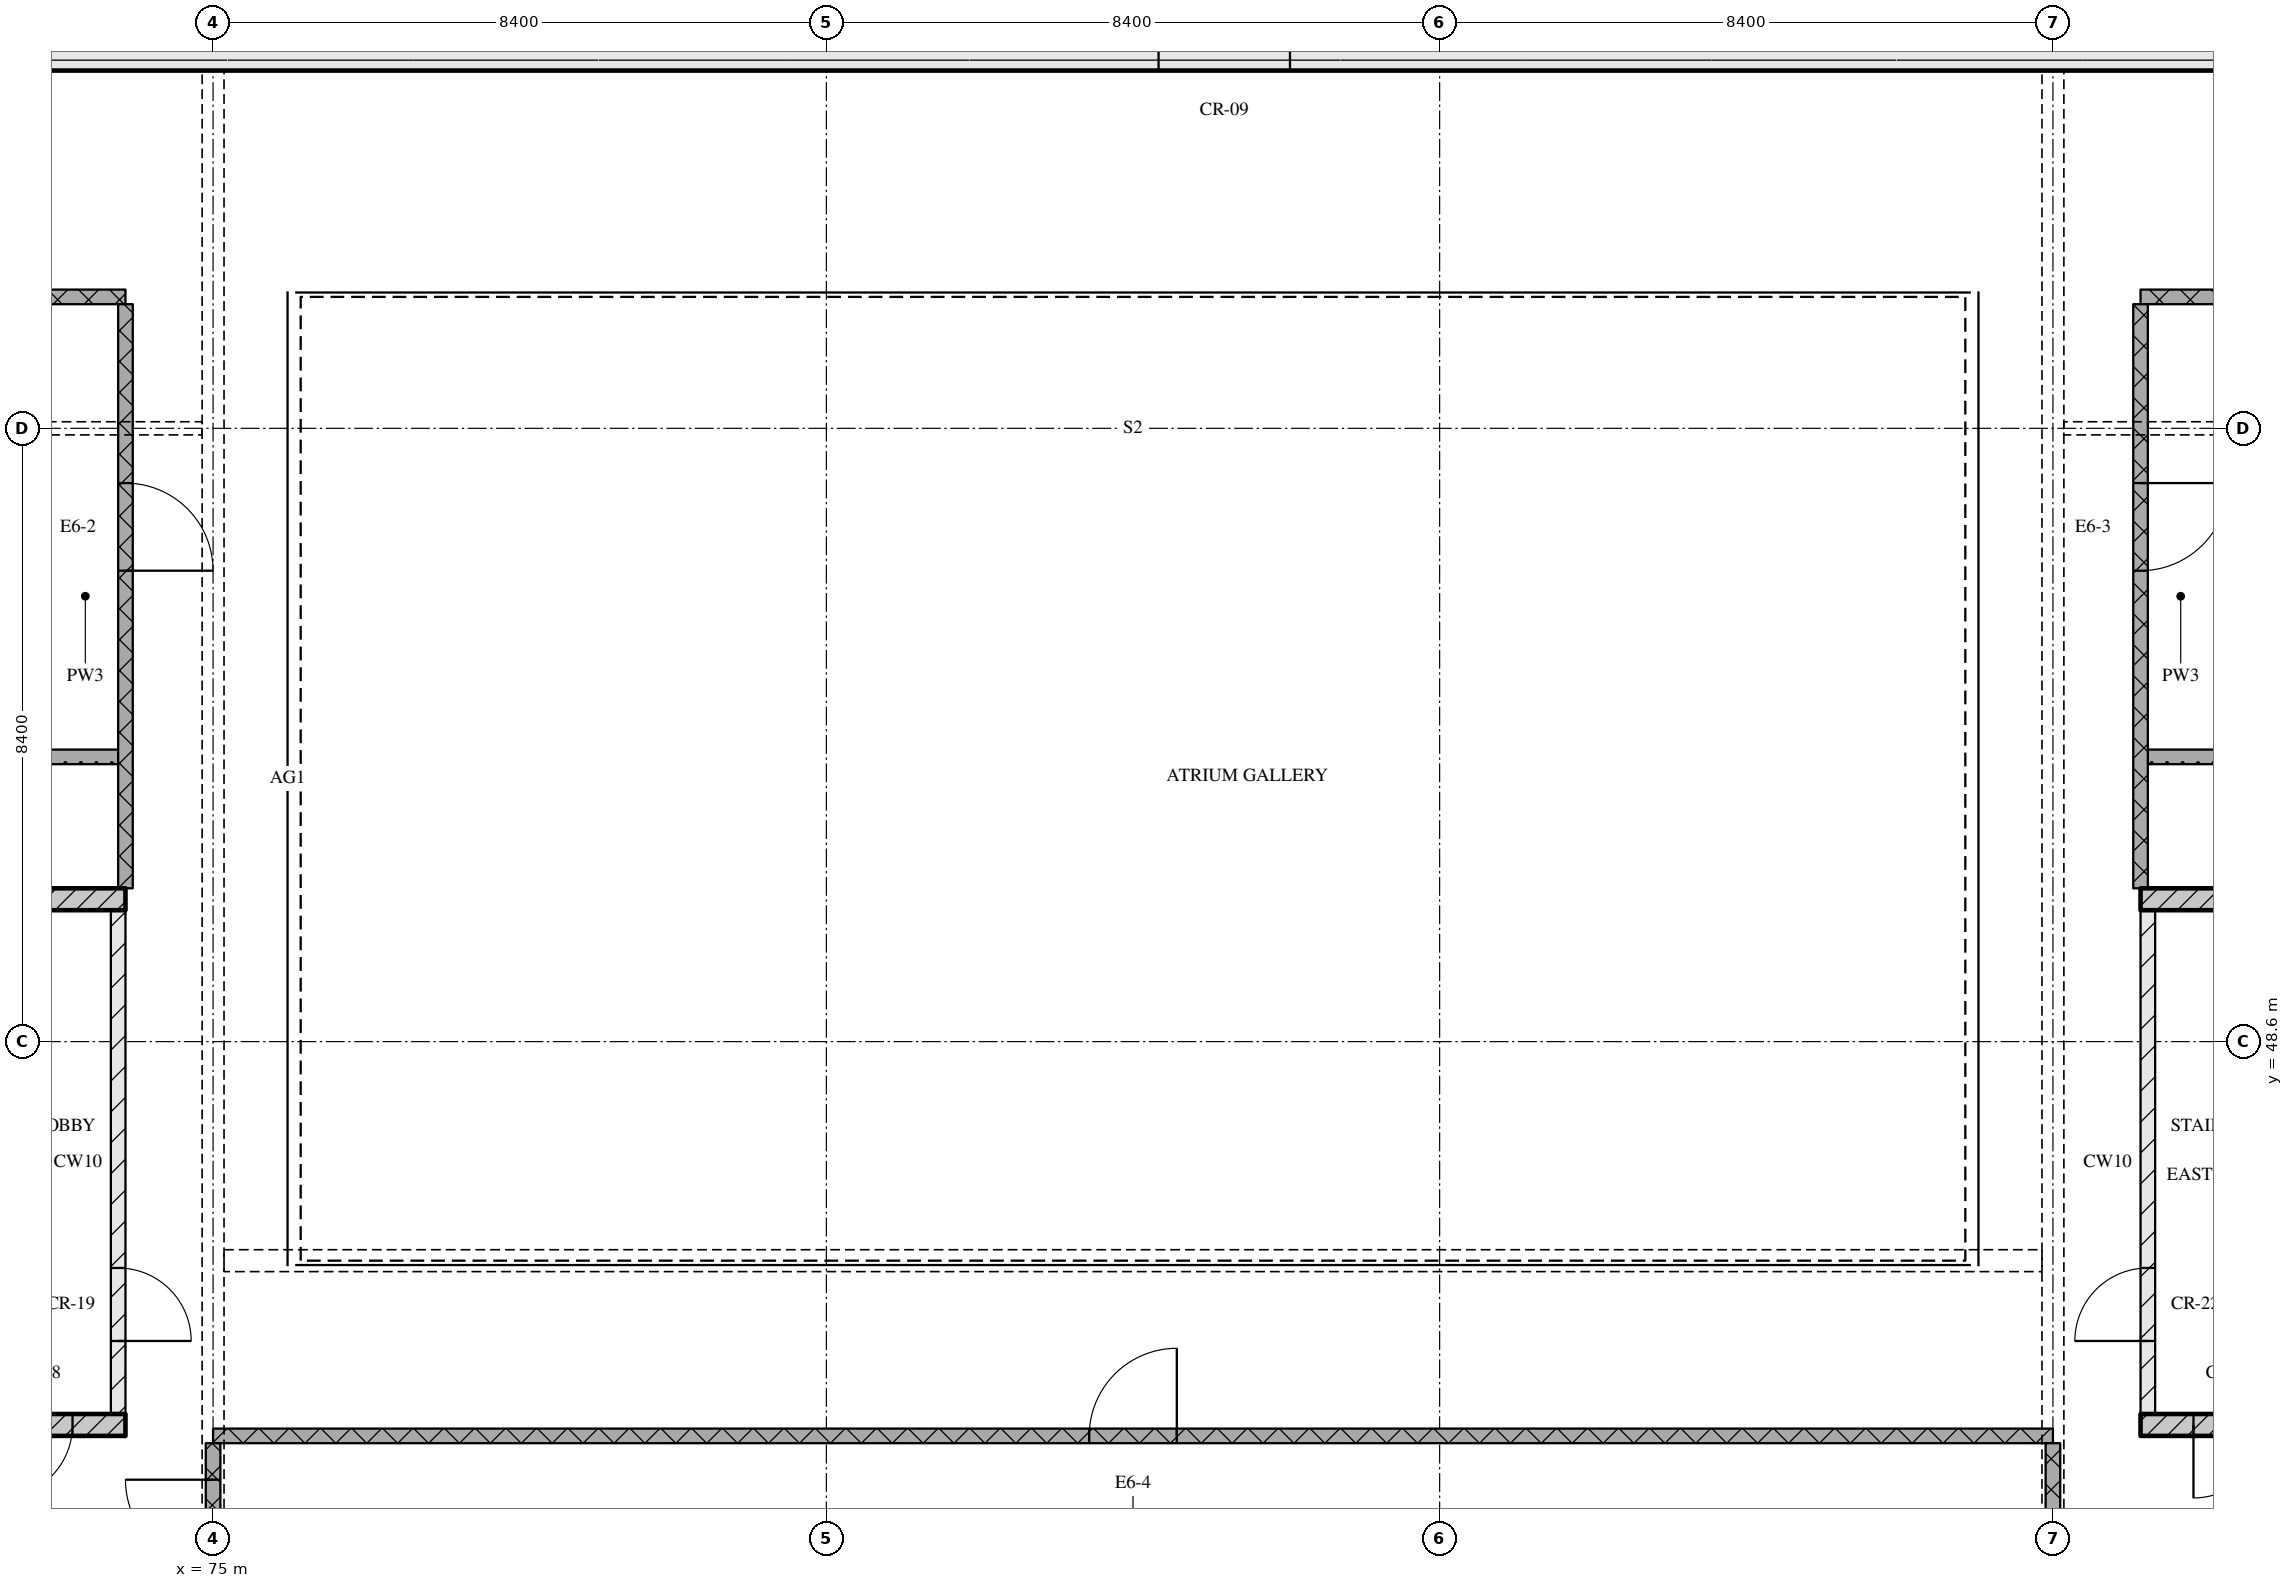
"""IFC4 building model, lengths in metres.
Left out: names, types, materials, properties, quantities, classifications, styles, units other than length and angle.
Written with IfcOpenShell. Run it as: python <this file> out.ifc"""

import sys

from ifc_helpers import new_model, si_unit, direction, frame, frame_2d, origin, place, context, subcontext, project, spatial, rectangle, extrude, element, fill, save


model = new_model("IFC4")
c1 = context("Model", 3, precision=1e-05, world=origin(), true_north=direction((0.0, 1.0)))
c2 = subcontext(c1, "Body", "Model", "MODEL_VIEW")
j1 = project(units=[si_unit("LENGTHUNIT", "METRE"), si_unit("PLANEANGLEUNIT", "RADIAN")], contexts=[c1])
p1 = place(None, origin())
s1 = spatial("IfcSite", under=j1, at=p1, CompositionType="ELEMENT")
p2 = place(p1, origin())
s2 = spatial("IfcBuilding", under=s1, at=p2, CompositionType="ELEMENT")
p3 = place(p2, frame((0.0, 0.0, 299.55)))
s3 = spatial("IfcBuildingStorey", under=s2, at=p3, CompositionType="ELEMENT", Elevation=299.55)
p4 = place(p3, frame((67.3, 62.15, 0.0), z_axis=(0.0, 0.0, 1.0), x_axis=(1.0, 0.0, 0.0)))
e1 = element("IfcWall", 1, at=p4, inside=s3, PredefinedType="SOLIDWALL", context=c2, shape_type="SweptSolid", body=[
    extrude(rectangle(XDim=40.6, YDim=0.5, at=frame_2d((20.3, 0.0))), origin(), (0.0, 0.0, 1.0), 3.32),
])
p5 = place(p4, frame((20.65, 0.0, 0.0)))
e2 = element("IfcOpeningElement", 2, at=p5, cuts=e1, PredefinedType="OPENING", context=c2, shape_type="SweptSolid", body=[
    extrude(rectangle(XDim=1.8, YDim=2.1, at=frame_2d((0.9, 1.05))), frame((0.0, 0.26, 0.0), z_axis=(0.0, -1.0, 0.0), x_axis=(1.0, 0.0, 0.0)), (0.0, 0.0, 1.0), 0.52),
])
p6 = place(p3, frame((68.2, 43.35, 0.0), z_axis=(0.0, 0.0, 1.0), x_axis=(1.0, 0.0, 0.0)))
e3 = element("IfcWall", 3, at=p6, inside=s3, PredefinedType="SOLIDWALL", context=c2, shape_type="SweptSolid", body=[
    extrude(rectangle(XDim=5.6, YDim=0.3, at=frame_2d((2.8, 0.0))), origin(), (0.0, 0.0, 1.0), 3.32),
])
p7 = place(p6, frame((3.875, 0.0, 0.0)))
e4 = element("IfcOpeningElement", 4, at=p7, cuts=e3, PredefinedType="OPENING", context=c2, shape_type="SweptSolid", body=[
    extrude(rectangle(XDim=1.0, YDim=2.1, at=frame_2d((0.5, 1.05))), frame((0.0, 0.16, 0.0), z_axis=(0.0, -1.0, 0.0), x_axis=(1.0, 0.0, 0.0)), (0.0, 0.0, 1.0), 0.32),
])
p8 = place(p3, frame((73.7, 43.5, 0.0), z_axis=(0.0, 0.0, 1.0), x_axis=(0.0, 1.0, 0.0)))
e5 = element("IfcWall", 5, at=p8, inside=s3, PredefinedType="PARTITIONING", context=c2, shape_type="SweptSolid", body=[
    extrude(rectangle(XDim=6.9, YDim=0.2, at=frame_2d((3.45, 0.0))), origin(), (0.0, 0.0, 1.0), 3.32),
])
p9 = place(p8, frame((1.0, 0.0, 0.0)))
e6 = element("IfcOpeningElement", 6, at=p9, cuts=e5, PredefinedType="OPENING", context=c2, shape_type="SweptSolid", body=[
    extrude(rectangle(XDim=1.0, YDim=2.1, at=frame_2d((0.5, 1.05))), frame((0.0, 0.11, 0.0), z_axis=(0.0, -1.0, 0.0), x_axis=(1.0, 0.0, 0.0)), (0.0, 0.0, 1.0), 0.22),
])
p10 = place(p3, frame((68.2, 50.55, 0.0), z_axis=(0.0, 0.0, 1.0), x_axis=(1.0, 0.0, 0.0)))
e7 = element("IfcWall", 7, at=p10, inside=s3, PredefinedType="SOLIDWALL", context=c2, shape_type="SweptSolid", body=[
    extrude(rectangle(XDim=5.6, YDim=0.3, at=frame_2d((2.8, 0.0))), origin(), (0.0, 0.0, 1.0), 3.32),
])
p11 = place(p3, frame((101.4, 43.35, 0.0), z_axis=(0.0, 0.0, 1.0), x_axis=(1.0, 0.0, 0.0)))
e8 = element("IfcWall", 8, at=p11, inside=s3, PredefinedType="SOLIDWALL", context=c2, shape_type="SweptSolid", body=[
    extrude(rectangle(XDim=5.6, YDim=0.3, at=frame_2d((2.8, 0.0))), origin(), (0.0, 0.0, 1.0), 3.32),
])
p12 = place(p11, frame((0.725, 0.0, 0.0)))
e9 = element("IfcOpeningElement", 9, at=p12, cuts=e8, PredefinedType="OPENING", context=c2, shape_type="SweptSolid", body=[
    extrude(rectangle(XDim=1.0, YDim=2.1, at=frame_2d((0.5, 1.05))), frame((0.0, 0.16, 0.0), z_axis=(0.0, -1.0, 0.0), x_axis=(1.0, 0.0, 0.0)), (0.0, 0.0, 1.0), 0.32),
])
p13 = place(p3, frame((101.5, 43.5, 0.0), z_axis=(0.0, 0.0, 1.0), x_axis=(0.0, 1.0, 0.0)))
e10 = element("IfcWall", 10, at=p13, inside=s3, PredefinedType="PARTITIONING", context=c2, shape_type="SweptSolid", body=[
    extrude(rectangle(XDim=6.9, YDim=0.2, at=frame_2d((3.45, 0.0))), origin(), (0.0, 0.0, 1.0), 3.32),
])
p14 = place(p13, frame((1.0, 0.0, 0.0)))
e11 = element("IfcOpeningElement", 11, at=p14, cuts=e10, PredefinedType="OPENING", context=c2, shape_type="SweptSolid", body=[
    extrude(rectangle(XDim=1.0, YDim=2.1, at=frame_2d((0.5, 1.05))), frame((0.0, 0.11, 0.0), z_axis=(0.0, -1.0, 0.0), x_axis=(1.0, 0.0, 0.0)), (0.0, 0.0, 1.0), 0.22),
])
p15 = place(p3, frame((101.4, 50.55, 0.0), z_axis=(0.0, 0.0, 1.0), x_axis=(1.0, 0.0, 0.0)))
e12 = element("IfcWall", 12, at=p15, inside=s3, PredefinedType="SOLIDWALL", context=c2, shape_type="SweptSolid", body=[
    extrude(rectangle(XDim=5.6, YDim=0.3, at=frame_2d((2.8, 0.0))), origin(), (0.0, 0.0, 1.0), 3.32),
])
p16 = place(p3, frame((100.2, 43.2, 0.0), z_axis=(0.0, 0.0, 1.0), x_axis=(-1.0, 0.0, 0.0)))
e13 = element("IfcWall", 13, at=p16, inside=s3, PredefinedType="PARTITIONING", context=c2, shape_type="SweptSolid", body=[
    extrude(rectangle(XDim=25.2, YDim=0.2, at=frame_2d((12.6, 0.0))), origin(), (0.0, 0.0, 1.0), 3.32),
])
p17 = place(p16, frame((12.0, 0.0, 0.0)))
e14 = element("IfcOpeningElement", 14, at=p17, cuts=e13, PredefinedType="OPENING", context=c2, shape_type="SweptSolid", body=[
    extrude(rectangle(XDim=1.2, YDim=2.1, at=frame_2d((0.6, 1.05))), frame((0.0, 0.11, 0.0), z_axis=(0.0, -1.0, 0.0), x_axis=(1.0, 0.0, 0.0)), (0.0, 0.0, 1.0), 0.22),
])
for number, where, z_axis, x_axis in (
    (15, (56.68, 52.5, 0.0), (0.0, 0.0, 1.0), (1.0, 0.0, 0.0)),
    (16, (101.5, 52.5, 0.0), (0.0, 0.0, 1.0), (1.0, 0.0, 0.0)),
):
    element("IfcWall", number, at=place(p3, frame(where, z_axis=z_axis, x_axis=x_axis)), inside=s3, PredefinedType="PARTITIONING", context=c2, shape_type="SweptSolid", body=[
        extrude(rectangle(XDim=17.02, YDim=0.2, at=frame_2d((8.51, 0.0))), origin(), (0.0, 0.0, 1.0), 3.32),
    ])
for number, where, z_axis, x_axis in (
    (17, (64.2, 58.8, 0.0), (0.0, 0.0, 1.0), (1.0, 0.0, 0.0)),
    (18, (101.4, 58.8, 0.0), (0.0, 0.0, 1.0), (1.0, 0.0, 0.0)),
):
    element("IfcWall", number, at=place(p3, frame(where, z_axis=z_axis, x_axis=x_axis)), inside=s3, PredefinedType="PARTITIONING", context=c2, shape_type="SweptSolid", body=[
        extrude(rectangle(XDim=9.6, YDim=0.2, at=frame_2d((4.8, 0.0))), origin(), (0.0, 0.0, 1.0), 3.32),
    ])
p18 = place(p3, frame((73.8, 50.7, 0.0), z_axis=(0.0, 0.0, 1.0), x_axis=(0.0, 1.0, 0.0)))
e19 = element("IfcWall", 19, at=p18, inside=s3, PredefinedType="PARTITIONING", context=c2, shape_type="SweptSolid", body=[
    extrude(rectangle(XDim=8.0, YDim=0.2, at=frame_2d((4.0, 0.0))), origin(), (0.0, 0.0, 1.0), 3.32),
])
p19 = place(p18, frame((4.35, 0.0, 0.0)))
e20 = element("IfcOpeningElement", 20, at=p19, cuts=e19, PredefinedType="OPENING", context=c2, shape_type="SweptSolid", body=[
    extrude(rectangle(XDim=1.2, YDim=2.1, at=frame_2d((0.6, 1.05))), frame((0.0, 0.11, 0.0), z_axis=(0.0, -1.0, 0.0), x_axis=(1.0, 0.0, 0.0)), (0.0, 0.0, 1.0), 0.22),
])
p20 = place(p3, frame((75.0, 43.1, 0.0), z_axis=(0.0, 0.0, 1.0), x_axis=(0.0, -1.0, 0.0)))
e21 = element("IfcWall", 21, at=p20, inside=s3, PredefinedType="PARTITIONING", context=c2, shape_type="SweptSolid", body=[
    extrude(rectangle(XDim=2.2, YDim=0.2, at=frame_2d((1.1, 0.0))), origin(), (0.0, 0.0, 1.0), 2.53),
])
p21 = place(p20, frame((0.5, 0.0, 0.0)))
e22 = element("IfcOpeningElement", 22, at=p21, cuts=e21, PredefinedType="OPENING", context=c2, shape_type="SweptSolid", body=[
    extrude(rectangle(XDim=1.2, YDim=2.1, at=frame_2d((0.6, 1.05))), frame((0.0, 0.11, 0.0), z_axis=(0.0, -1.0, 0.0), x_axis=(1.0, 0.0, 0.0)), (0.0, 0.0, 1.0), 0.22),
])
p22 = place(p3, frame((100.2, 43.1, 0.0), z_axis=(0.0, 0.0, 1.0), x_axis=(0.0, -1.0, 0.0)))
e23 = element("IfcWall", 23, at=p22, inside=s3, PredefinedType="PARTITIONING", context=c2, shape_type="SweptSolid", body=[
    extrude(rectangle(XDim=2.2, YDim=0.2, at=frame_2d((1.1, 0.0))), origin(), (0.0, 0.0, 1.0), 2.53),
])
p23 = place(p3, frame((101.4, 58.7, 0.0), z_axis=(0.0, 0.0, 1.0), x_axis=(0.0, -1.0, 0.0)))
e24 = element("IfcWall", 24, at=p23, inside=s3, PredefinedType="PARTITIONING", context=c2, shape_type="SweptSolid", body=[
    extrude(rectangle(XDim=8.0, YDim=0.2, at=frame_2d((4.0, 0.0))), origin(), (0.0, 0.0, 1.0), 3.32),
])
p24 = place(p23, frame((2.45, 0.0, 0.0)))
e25 = element("IfcOpeningElement", 25, at=p24, cuts=e24, PredefinedType="OPENING", context=c2, shape_type="SweptSolid", body=[
    extrude(rectangle(XDim=1.2, YDim=2.1, at=frame_2d((0.6, 1.05))), frame((0.0, 0.11, 0.0), z_axis=(0.0, -1.0, 0.0), x_axis=(1.0, 0.0, 0.0)), (0.0, 0.0, 1.0), 0.22),
])
p25 = place(p5, origin())
e26 = element("IfcDoor", 26, at=p25, inside=s3, OperationType="DOUBLE_DOOR_SINGLE_SWING", PredefinedType="DOOR", context=c2, shape_type="SweptSolid", body=[
    extrude(rectangle(XDim=1.8, YDim=2.1, at=frame_2d((0.9, 1.05))), frame((0.0, 0.025, 0.0), z_axis=(0.0, -1.0, 0.0), x_axis=(1.0, 0.0, 0.0)), (0.0, 0.0, 1.0), 0.05),
])
fill(e2, e26)
p26 = place(p7, origin())
e27 = element("IfcDoor", 27, at=p26, inside=s3, OperationType="SINGLE_SWING_RIGHT", PredefinedType="DOOR", context=c2, shape_type="SweptSolid", body=[
    extrude(rectangle(XDim=1.0, YDim=2.1, at=frame_2d((0.5, 1.05))), frame((0.0, 0.025, 0.0), z_axis=(0.0, -1.0, 0.0), x_axis=(1.0, 0.0, 0.0)), (0.0, 0.0, 1.0), 0.05),
])
fill(e4, e27)
p27 = place(p9, origin())
e28 = element("IfcDoor", 28, at=p27, inside=s3, OperationType="SINGLE_SWING_RIGHT", PredefinedType="DOOR", context=c2, shape_type="SweptSolid", body=[
    extrude(rectangle(XDim=1.0, YDim=2.1, at=frame_2d((0.5, 1.05))), frame((0.0, 0.025, 0.0), z_axis=(0.0, -1.0, 0.0), x_axis=(1.0, 0.0, 0.0)), (0.0, 0.0, 1.0), 0.05),
])
fill(e6, e28)
p28 = place(p12, origin())
e29 = element("IfcDoor", 29, at=p28, inside=s3, OperationType="SINGLE_SWING_RIGHT", PredefinedType="DOOR", context=c2, shape_type="SweptSolid", body=[
    extrude(rectangle(XDim=1.0, YDim=2.1, at=frame_2d((0.5, 1.05))), frame((0.0, 0.025, 0.0), z_axis=(0.0, -1.0, 0.0), x_axis=(1.0, 0.0, 0.0)), (0.0, 0.0, 1.0), 0.05),
])
fill(e9, e29)
p29 = place(p14, origin())
e30 = element("IfcDoor", 30, at=p29, inside=s3, OperationType="SINGLE_SWING_LEFT", PredefinedType="DOOR", context=c2, shape_type="SweptSolid", body=[
    extrude(rectangle(XDim=1.0, YDim=2.1, at=frame_2d((0.5, 1.05))), frame((0.0, 0.025, 0.0), z_axis=(0.0, -1.0, 0.0), x_axis=(1.0, 0.0, 0.0)), (0.0, 0.0, 1.0), 0.05),
])
fill(e11, e30)
p30 = place(p17, origin())
e31 = element("IfcDoor", 31, at=p30, inside=s3, OperationType="SINGLE_SWING_RIGHT", PredefinedType="DOOR", context=c2, shape_type="SweptSolid", body=[
    extrude(rectangle(XDim=1.2, YDim=2.1, at=frame_2d((0.6, 1.05))), frame((0.0, 0.025, 0.0), z_axis=(0.0, -1.0, 0.0), x_axis=(1.0, 0.0, 0.0)), (0.0, 0.0, 1.0), 0.05),
])
fill(e14, e31)
p31 = place(p19, origin())
e32 = element("IfcDoor", 32, at=p31, inside=s3, OperationType="SINGLE_SWING_RIGHT", PredefinedType="DOOR", context=c2, shape_type="SweptSolid", body=[
    extrude(rectangle(XDim=1.2, YDim=2.1, at=frame_2d((0.6, 1.05))), frame((0.0, 0.025, 0.0), z_axis=(0.0, -1.0, 0.0), x_axis=(1.0, 0.0, 0.0)), (0.0, 0.0, 1.0), 0.05),
])
fill(e20, e32)
p32 = place(p21, origin())
e33 = element("IfcDoor", 33, at=p32, inside=s3, OperationType="SINGLE_SWING_RIGHT", PredefinedType="DOOR", context=c2, shape_type="SweptSolid", body=[
    extrude(rectangle(XDim=1.2, YDim=2.1, at=frame_2d((0.6, 1.05))), frame((0.0, 0.025, 0.0), z_axis=(0.0, -1.0, 0.0), x_axis=(1.0, 0.0, 0.0)), (0.0, 0.0, 1.0), 0.05),
])
fill(e22, e33)
p33 = place(p24, origin())
e34 = element("IfcDoor", 34, at=p33, inside=s3, OperationType="SINGLE_SWING_LEFT", PredefinedType="DOOR", context=c2, shape_type="SweptSolid", body=[
    extrude(rectangle(XDim=1.2, YDim=2.1, at=frame_2d((0.6, 1.05))), frame((0.0, 0.025, 0.0), z_axis=(0.0, -1.0, 0.0), x_axis=(1.0, 0.0, 0.0)), (0.0, 0.0, 1.0), 0.05),
])
fill(e25, e34)
save(model, sys.argv[1])
